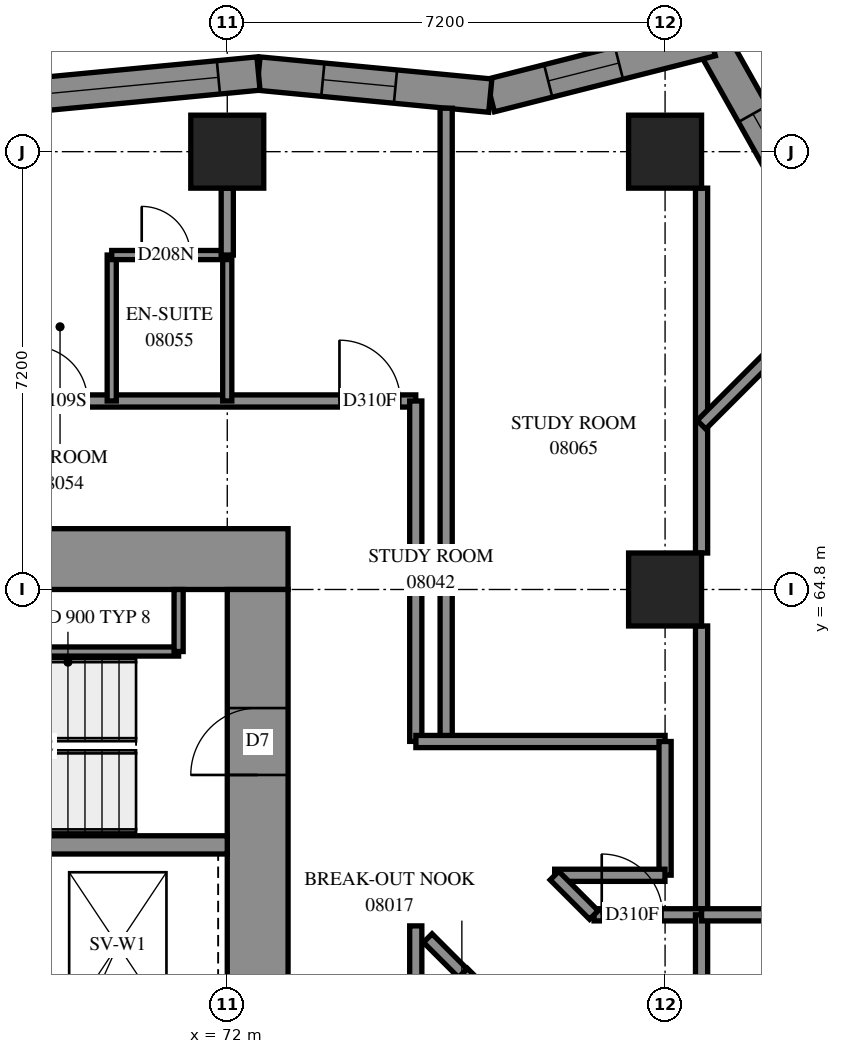
"""IFC4 building model, lengths in metres.
Left out: names, types, materials, properties, quantities, classifications, styles, units other than length and angle.
Written with IfcOpenShell. Run it as: python <this file> out.ifc"""

import sys

from ifc_helpers import new_model, si_unit, direction, frame, frame_2d, origin, origin_2d, place, context, subcontext, project, spatial, polyline, rectangle, outline, extrude, element, fill, save


model = new_model("IFC4")
c1 = context("Model", 3, precision=1e-05, world=origin(), true_north=direction((0.0, 1.0)))
c2 = subcontext(c1, "Body", "Model", "MODEL_VIEW")
j1 = project(units=[si_unit("LENGTHUNIT", "METRE"), si_unit("PLANEANGLEUNIT", "RADIAN")], contexts=[c1])
p1 = place(None, origin())
s1 = spatial("IfcSite", under=j1, at=p1, CompositionType="ELEMENT")
p2 = place(p1, origin())
s2 = spatial("IfcBuilding", under=s1, at=p2, CompositionType="ELEMENT")
p3 = place(p2, frame((0.0, 0.0, 33.8)))
s3 = spatial("IfcBuildingStorey", under=s2, at=p3, CompositionType="ELEMENT", Elevation=33.8)
for number, where, z_axis, x_axis in (
    (1, (72.0, 72.0, 0.0), (0.0, 0.0, 1.0), (1.0, 0.0, 0.0)),
    (2, (79.2, 64.8, 0.0), (0.0, 0.0, 1.0), (1.0, 0.0, 0.0)),
    (3, (79.2, 72.0, 0.0), (0.0, 0.0, 1.0), (1.0, 0.0, 0.0)),
):
    element("IfcColumn", number, at=place(p3, frame(where, z_axis=z_axis, x_axis=x_axis)), inside=s3, PredefinedType="COLUMN", context=c2, shape_type="SweptSolid", body=[
        extrude(rectangle(XDim=1.2, YDim=1.2, at=origin_2d()), origin(), (0.0, 0.0, 1.0), 3.1),
    ])
p4 = place(p3, frame((56.6, 65.3, -0.3), z_axis=(0.0, 0.0, 1.0), x_axis=(1.0, 0.0, 0.0)))
e4 = element("IfcWall", 4, at=p4, inside=s3, PredefinedType="SHEAR", context=c2, shape_type="SweptSolid", body=[
    extrude(rectangle(XDim=16.4, YDim=1.0, at=frame_2d((8.2, 0.0))), origin(), (0.0, 0.0, 1.0), 2.7),
])
p5 = place(p4, frame((11.0, 0.0, 0.3)))
e5 = element("IfcOpeningElement", 5, at=p5, cuts=e4, PredefinedType="OPENING", context=c2, shape_type="SweptSolid", body=[
    extrude(rectangle(XDim=0.8, YDim=2.1, at=frame_2d((0.4, 1.05))), frame((0.0, 0.51, 0.0), z_axis=(0.0, -1.0, 0.0), x_axis=(1.0, 0.0, 0.0)), (0.0, 0.0, 1.0), 1.02),
])
p6 = place(p3, frame((72.5, 50.4, -0.3), z_axis=(0.0, 0.0, 1.0), x_axis=(0.0, 1.0, 0.0)))
e6 = element("IfcWall", 6, at=p6, inside=s3, PredefinedType="SHEAR", context=c2, shape_type="SweptSolid", body=[
    extrude(rectangle(XDim=14.4, YDim=1.0, at=frame_2d((7.2, 0.0))), origin(), (0.0, 0.0, 1.0), 2.7),
])
p7 = place(p6, frame((4.55, 0.0, 0.3)))
e7 = element("IfcOpeningElement", 7, at=p7, cuts=e6, PredefinedType="OPENING", context=c2, shape_type="SweptSolid", body=[
    extrude(rectangle(XDim=1.1, YDim=2.1, at=frame_2d((0.55, 1.05))), frame((0.0, 0.51, 0.0), z_axis=(0.0, -1.0, 0.0), x_axis=(1.0, 0.0, 0.0)), (0.0, 0.0, 1.0), 1.02),
])
p8 = place(p6, frame((11.35, 0.0, 0.3)))
e8 = element("IfcOpeningElement", 8, at=p8, cuts=e6, PredefinedType="OPENING", context=c2, shape_type="SweptSolid", body=[
    extrude(rectangle(XDim=1.1, YDim=2.1, at=frame_2d((0.55, 1.05))), frame((0.0, 0.51, 0.0), z_axis=(0.0, -1.0, 0.0), x_axis=(1.0, 0.0, 0.0)), (0.0, 0.0, 1.0), 1.02),
])
p9 = place(p3, frame((64.8, 60.6, 0.0), z_axis=(0.0, 0.0, 1.0), x_axis=(1.0, 0.0, 0.0)))
e9 = element("IfcWall", 9, at=p9, inside=s3, PredefinedType="SOLIDWALL", context=c2, shape_type="SweptSolid", body=[
    extrude(rectangle(XDim=7.2, YDim=0.3, at=frame_2d((3.6, 0.0))), origin(), (0.0, 0.0, 1.0), 3.1),
])
p10 = place(p3, frame((76.301, 49.443, -0.3), z_axis=(0.0, 0.0, 1.0), x_axis=(0.7071067812, 0.7071067812, 0.0)))
e10 = element("IfcWall", 10, at=p10, inside=s3, PredefinedType="SHEAR", context=c2, shape_type="SweptSolid", body=[
    extrude(rectangle(XDim=14.4, YDim=1.0, at=frame_2d((7.2, 0.0))), origin(), (0.0, 0.0, 1.0), 2.7),
])
p11 = place(p10, frame((4.55, 0.0, 0.3)))
e11 = element("IfcOpeningElement", 11, at=p11, cuts=e10, PredefinedType="OPENING", context=c2, shape_type="SweptSolid", body=[
    extrude(rectangle(XDim=1.1, YDim=2.1, at=frame_2d((0.55, 1.05))), frame((0.0, 0.51, 0.0), z_axis=(0.0, -1.0, 0.0), x_axis=(1.0, 0.0, 0.0)), (0.0, 0.0, 1.0), 1.02),
])
p12 = place(p10, frame((11.35, 0.0, 0.3)))
e12 = element("IfcOpeningElement", 12, at=p12, cuts=e10, PredefinedType="OPENING", context=c2, shape_type="SweptSolid", body=[
    extrude(rectangle(XDim=1.1, YDim=2.1, at=frame_2d((0.55, 1.05))), frame((0.0, 0.51, 0.0), z_axis=(0.0, -1.0, 0.0), x_axis=(1.0, 0.0, 0.0)), (0.0, 0.0, 1.0), 1.02),
])
p13 = place(p3, frame((81.628, 70.875, 0.0), z_axis=(0.0, 0.0, 1.0), x_axis=(-0.4901845493, 0.871618671, 0.0)))
e13 = element("IfcWall", 13, at=p13, inside=s3, PredefinedType="SOLIDWALL", context=c2, shape_type="SweptSolid", body=[
    extrude(outline(polyline([(0.053, -0.275), (3.616, -0.275), (3.195, 0.275), (-0.053, 0.275), (0.053, -0.275)])), origin(), (0.0, 0.0, 1.0), 3.1),
])
p14 = place(p13, frame((0.804, 0.0, 0.5)))
e14 = element("IfcOpeningElement", 14, at=p14, cuts=e13, PredefinedType="OPENING", context=c2, shape_type="SweptSolid", body=[
    extrude(rectangle(XDim=1.2, YDim=2.45, at=frame_2d((0.6, 1.225))), frame((0.0, 0.285, 0.0), z_axis=(0.0, -1.0, 0.0), x_axis=(1.0, 0.0, 0.0)), (0.0, 0.0, 1.0), 0.57),
])
p15 = place(p3, frame((79.959, 73.843, 0.0), z_axis=(0.0, 0.0, 1.0), x_axis=(-0.9693399956, -0.2457233667, 0.0)))
e15 = element("IfcWall", 15, at=p15, inside=s3, PredefinedType="SOLIDWALL", context=c2, shape_type="SweptSolid", body=[
    extrude(outline(polyline([(-0.21, -0.275), (3.7, -0.275), (3.796, 0.275), (0.21, 0.275), (-0.21, -0.275)])), origin(), (0.0, 0.0, 1.0), 3.1),
])
p16 = place(p15, frame((1.565, 0.0, 0.5)))
e16 = element("IfcOpeningElement", 16, at=p16, cuts=e15, PredefinedType="OPENING", context=c2, shape_type="SweptSolid", body=[
    extrude(rectangle(XDim=1.2, YDim=2.45, at=frame_2d((0.6, 1.225))), frame((0.0, 0.285, 0.0), z_axis=(0.0, -1.0, 0.0), x_axis=(1.0, 0.0, 0.0)), (0.0, 0.0, 1.0), 0.57),
])
p17 = place(p3, frame((76.326, 72.922, 0.0), z_axis=(0.0, 0.0, 1.0), x_axis=(-0.9954951205, 0.0948127894, 0.0)))
e17 = element("IfcWall", 17, at=p17, inside=s3, PredefinedType="SOLIDWALL", context=c2, shape_type="SweptSolid", body=[
    extrude(outline(polyline([(0.048, -0.275), (3.856, -0.275), (3.803, 0.275), (-0.048, 0.275), (0.048, -0.275)])), origin(), (0.0, 0.0, 1.0), 3.1),
])
p18 = place(p17, frame((1.566, 0.0, 0.5)))
e18 = element("IfcOpeningElement", 18, at=p18, cuts=e17, PredefinedType="OPENING", context=c2, shape_type="SweptSolid", body=[
    extrude(rectangle(XDim=1.2, YDim=2.45, at=frame_2d((0.6, 1.225))), frame((0.0, 0.285, 0.0), z_axis=(0.0, -1.0, 0.0), x_axis=(1.0, 0.0, 0.0)), (0.0, 0.0, 1.0), 0.57),
])
p19 = place(p3, frame((72.513, 73.285, 0.0), z_axis=(0.0, 0.0, 1.0), x_axis=(-0.9954966527, -0.0947967005, 0.0)))
e19 = element("IfcWall", 19, at=p19, inside=s3, PredefinedType="SOLIDWALL", context=c2, shape_type="SweptSolid", body=[
    extrude(outline(polyline([(-0.026, -0.275), (3.782, -0.275), (3.834, 0.275), (0.026, 0.275), (-0.026, -0.275)])), origin(), (0.0, 0.0, 1.0), 3.1),
])
p20 = place(p19, frame((0.662, 0.0, 0.5)))
e20 = element("IfcOpeningElement", 20, at=p20, cuts=e19, PredefinedType="OPENING", context=c2, shape_type="SweptSolid", body=[
    extrude(rectangle(XDim=2.8, YDim=2.45, at=frame_2d((1.4, 1.225))), frame((0.0, 0.285, 0.0), z_axis=(0.0, -1.0, 0.0), x_axis=(1.0, 0.0, 0.0)), (0.0, 0.0, 1.0), 0.57),
])
p21 = place(p3, frame((64.95, 63.78, 0.0), z_axis=(0.0, 0.0, 1.0), x_axis=(1.0, 0.0, 0.0)))
e21 = element("IfcWall", 21, at=p21, inside=s3, PredefinedType="PARTITIONING", context=c2, shape_type="SweptSolid", body=[
    extrude(rectangle(XDim=6.25, YDim=0.15, at=frame_2d((3.125, 0.0))), origin(), (0.0, 0.0, 1.0), 3.1),
])
p22 = place(p3, frame((71.2, 63.78, 0.0), z_axis=(0.0, 0.0, 1.0), x_axis=(0.0, 1.0, 0.0)))
e22 = element("IfcWall", 22, at=p22, inside=s3, PredefinedType="PARTITIONING", context=c2, shape_type="SweptSolid", body=[
    extrude(rectangle(XDim=1.02, YDim=0.15, at=frame_2d((0.51, 0.0))), origin(), (0.0, 0.0, 1.0), 3.1),
])
p23 = place(p3, frame((54.5, 67.9, 0.0), z_axis=(0.0, 0.0, 1.0), x_axis=(1.0, 0.0, 0.0)))
e23 = element("IfcWall", 23, at=p23, inside=s3, PredefinedType="PARTITIONING", context=c2, shape_type="SweptSolid", body=[
    extrude(rectangle(XDim=20.6, YDim=0.2, at=frame_2d((10.3, 0.0))), origin(), (0.0, 0.0, 1.0), 3.1),
])
p24 = place(p23, frame((0.255, 0.0, 0.0)))
e24 = element("IfcOpeningElement", 24, at=p24, cuts=e23, PredefinedType="OPENING", context=c2, shape_type="SweptSolid", body=[
    extrude(rectangle(XDim=1.0, YDim=2.1, at=frame_2d((0.5, 1.05))), frame((0.0, 0.11, 0.0), z_axis=(0.0, -1.0, 0.0), x_axis=(1.0, 0.0, 0.0)), (0.0, 0.0, 1.0), 0.22),
])
p25 = place(p23, frame((19.345, 0.0, 0.0)))
e25 = element("IfcOpeningElement", 25, at=p25, cuts=e23, PredefinedType="OPENING", context=c2, shape_type="SweptSolid", body=[
    extrude(rectangle(XDim=1.0, YDim=2.1, at=frame_2d((0.5, 1.05))), frame((0.0, 0.11, 0.0), z_axis=(0.0, -1.0, 0.0), x_axis=(1.0, 0.0, 0.0)), (0.0, 0.0, 1.0), 0.22),
])
p26 = place(p23, frame((5.45, 0.0, 0.0)))
e26 = element("IfcOpeningElement", 26, at=p26, cuts=e23, PredefinedType="OPENING", context=c2, shape_type="SweptSolid", body=[
    extrude(rectangle(XDim=0.9, YDim=2.1, at=frame_2d((0.45, 1.05))), frame((0.0, 0.11, 0.0), z_axis=(0.0, -1.0, 0.0), x_axis=(1.0, 0.0, 0.0)), (0.0, 0.0, 1.0), 0.22),
])
p27 = place(p23, frame((7.1, 0.0, 0.0)))
e27 = element("IfcOpeningElement", 27, at=p27, cuts=e23, PredefinedType="OPENING", context=c2, shape_type="SweptSolid", body=[
    extrude(rectangle(XDim=0.9, YDim=2.1, at=frame_2d((0.45, 1.05))), frame((0.0, 0.11, 0.0), z_axis=(0.0, -1.0, 0.0), x_axis=(1.0, 0.0, 0.0)), (0.0, 0.0, 1.0), 0.22),
])
p28 = place(p23, frame((12.65, 0.0, 0.0)))
e28 = element("IfcOpeningElement", 28, at=p28, cuts=e23, PredefinedType="OPENING", context=c2, shape_type="SweptSolid", body=[
    extrude(rectangle(XDim=0.9, YDim=2.1, at=frame_2d((0.45, 1.05))), frame((0.0, 0.11, 0.0), z_axis=(0.0, -1.0, 0.0), x_axis=(1.0, 0.0, 0.0)), (0.0, 0.0, 1.0), 0.22),
])
p29 = place(p23, frame((14.3, 0.0, 0.0)))
e29 = element("IfcOpeningElement", 29, at=p29, cuts=e23, PredefinedType="OPENING", context=c2, shape_type="SweptSolid", body=[
    extrude(rectangle(XDim=0.9, YDim=2.1, at=frame_2d((0.45, 1.05))), frame((0.0, 0.11, 0.0), z_axis=(0.0, -1.0, 0.0), x_axis=(1.0, 0.0, 0.0)), (0.0, 0.0, 1.0), 0.22),
])
p30 = place(p3, frame((75.6, 62.3, 0.0), z_axis=(0.0, 0.0, 1.0), x_axis=(0.0, 1.0, 0.0)))
e30 = element("IfcWall", 30, at=p30, inside=s3, PredefinedType="PARTITIONING", context=c2, shape_type="SweptSolid", body=[
    extrude(rectangle(XDim=10.415, YDim=0.2, at=frame_2d((5.207, 0.0))), origin(), (0.0, 0.0, 1.0), 3.1),
])
p31 = place(p3, frame((79.8, 65.4, 0.0), z_axis=(0.0, 0.0, 1.0), x_axis=(0.0, 1.0, 0.0)))
e31 = element("IfcWall", 31, at=p31, inside=s3, PredefinedType="PARTITIONING", context=c2, shape_type="SweptSolid", body=[
    extrude(rectangle(XDim=6.0, YDim=0.2, at=frame_2d((3.0, 0.0))), origin(), (0.0, 0.0, 1.0), 3.1),
])
p32 = place(p3, frame((75.1, 62.302, 0.0), z_axis=(0.0, 0.0, 1.0), x_axis=(0.0, 1.0, 0.0)))
e32 = element("IfcWall", 32, at=p32, inside=s3, PredefinedType="PARTITIONING", context=c2, shape_type="SweptSolid", body=[
    extrude(rectangle(XDim=5.598, YDim=0.2, at=frame_2d((2.799, 0.0))), origin(), (0.0, 0.0, 1.0), 3.1),
])
p33 = place(p3, frame((79.8, 59.45, 0.0), z_axis=(0.0, 0.0, 1.0), x_axis=(0.0, 1.0, 0.0)))
e33 = element("IfcWall", 33, at=p33, inside=s3, PredefinedType="PARTITIONING", context=c2, shape_type="SweptSolid", body=[
    extrude(rectangle(XDim=4.75, YDim=0.2, at=frame_2d((2.375, 0.0))), origin(), (0.0, 0.0, 1.0), 3.1),
])
p34 = place(p3, frame((75.1, 55.102, 0.0), z_axis=(0.0, 0.0, 1.0), x_axis=(0.0, 1.0, 0.0)))
e34 = element("IfcWall", 34, at=p34, inside=s3, PredefinedType="PARTITIONING", context=c2, shape_type="SweptSolid", body=[
    extrude(rectangle(XDim=4.166, YDim=0.2, at=frame_2d((2.083, 0.0))), origin(), (0.0, 0.0, 1.0), 3.1),
])
p35 = place(p3, frame((75.102, 62.3, 0.0), z_axis=(0.0, 0.0, 1.0), x_axis=(1.0, 0.0, 0.0)))
e35 = element("IfcWall", 35, at=p35, inside=s3, PredefinedType="PARTITIONING", context=c2, shape_type="SweptSolid", body=[
    extrude(rectangle(XDim=4.098, YDim=0.2, at=frame_2d((2.049, 0.0))), origin(), (0.0, 0.0, 1.0), 3.1),
])
p36 = place(p3, frame((79.799, 67.509, 0.0), z_axis=(0.0, 0.0, 1.0), x_axis=(0.7070925395, 0.7071210226, 0.0)))
e36 = element("IfcWall", 36, at=p36, inside=s3, PredefinedType="PARTITIONING", context=c2, shape_type="SweptSolid", body=[
    extrude(rectangle(XDim=3.511, YDim=0.2, at=frame_2d((1.755, 0.0))), origin(), (0.0, 0.0, 1.0), 3.1),
])
for number, where, z_axis, x_axis in (
    (37, (70.1, 67.9, 0.0), (0.0, 0.0, 1.0), (0.0, 1.0, 0.0)),
    (38, (72.0, 67.9, 0.0), (0.0, 0.0, 1.0), (0.0, 1.0, 0.0)),
):
    element("IfcWall", number, at=place(p3, frame(where, z_axis=z_axis, x_axis=x_axis)), inside=s3, PredefinedType="PARTITIONING", context=c2, shape_type="SweptSolid", body=[
        extrude(rectangle(XDim=2.4, YDim=0.15, at=frame_2d((1.2, 0.0))), origin(), (0.0, 0.0, 1.0), 3.1),
    ])
p37 = place(p3, frame((79.2, 60.102, 0.0), z_axis=(0.0, 0.0, 1.0), x_axis=(0.0, 1.0, 0.0)))
e39 = element("IfcWall", 39, at=p37, inside=s3, PredefinedType="PARTITIONING", context=c2, shape_type="SweptSolid", body=[
    extrude(rectangle(XDim=2.198, YDim=0.2, at=frame_2d((1.099, 0.0))), origin(), (0.0, 0.0, 1.0), 3.1),
])
p38 = place(p3, frame((75.879, 58.497, 0.0), z_axis=(0.0, 0.0, 1.0), x_axis=(0.7075866635, -0.706626573, 0.0)))
e40 = element("IfcWall", 40, at=p38, inside=s3, PredefinedType="PARTITIONING", context=c2, shape_type="SweptSolid", body=[
    extrude(rectangle(XDim=2.083, YDim=0.2, at=frame_2d((1.042, 0.0))), origin(), (0.0, 0.0, 1.0), 3.1),
])
p39 = place(p3, frame((70.1, 70.3, 0.0), z_axis=(0.0, 0.0, 1.0), x_axis=(1.0, 0.0, 0.0)))
e41 = element("IfcWall", 41, at=p39, inside=s3, PredefinedType="PARTITIONING", context=c2, shape_type="SweptSolid", body=[
    extrude(rectangle(XDim=1.9, YDim=0.15, at=frame_2d((0.95, 0.0))), origin(), (0.0, 0.0, 1.0), 3.1),
])
p40 = place(p39, frame((0.493, 0.0, 0.0)))
e42 = element("IfcOpeningElement", 42, at=p40, cuts=e41, PredefinedType="OPENING", context=c2, shape_type="SweptSolid", body=[
    extrude(rectangle(XDim=0.8, YDim=2.1, at=frame_2d((0.4, 1.05))), frame((0.0, 0.085, 0.0), z_axis=(0.0, -1.0, 0.0), x_axis=(1.0, 0.0, 0.0)), (0.0, 0.0, 1.0), 0.17),
])
p41 = place(p3, frame((77.384, 60.1, 0.0), z_axis=(0.0, 0.0, 1.0), x_axis=(1.0, 0.0, 0.0)))
e43 = element("IfcWall", 43, at=p41, inside=s3, PredefinedType="PARTITIONING", context=c2, shape_type="SweptSolid", body=[
    extrude(rectangle(XDim=1.814, YDim=0.2, at=frame_2d((0.907, 0.0))), origin(), (0.0, 0.0, 1.0), 3.1),
])
p42 = place(p3, frame((78.032, 59.45, 0.0), z_axis=(0.0, 0.0, 1.0), x_axis=(1.0, 0.0, 0.0)))
e44 = element("IfcWall", 44, at=p42, inside=s3, PredefinedType="PARTITIONING", context=c2, shape_type="SweptSolid", body=[
    extrude(rectangle(XDim=1.768, YDim=0.2, at=frame_2d((0.884, 0.0))), origin(), (0.0, 0.0, 1.0), 3.1),
])
p43 = place(p42, frame((0.126, 0.0, 0.0)))
e45 = element("IfcOpeningElement", 45, at=p43, cuts=e44, PredefinedType="OPENING", context=c2, shape_type="SweptSolid", body=[
    extrude(rectangle(XDim=1.0, YDim=2.1, at=frame_2d((0.5, 1.05))), frame((0.0, 0.11, 0.0), z_axis=(0.0, -1.0, 0.0), x_axis=(1.0, 0.0, 0.0)), (0.0, 0.0, 1.0), 0.22),
])
p44 = place(p3, frame((79.8, 58.2, 0.0), z_axis=(0.0, 0.0, 1.0), x_axis=(0.0, 1.0, 0.0)))
e46 = element("IfcWall", 46, at=p44, inside=s3, PredefinedType="PARTITIONING", context=c2, shape_type="SweptSolid", body=[
    extrude(rectangle(XDim=1.25, YDim=0.2, at=frame_2d((0.625, 0.0))), origin(), (0.0, 0.0, 1.0), 3.1),
])
p45 = place(p3, frame((79.8, 59.45, 0.0), z_axis=(0.0, 0.0, 1.0), x_axis=(1.0, 0.0, 0.0)))
e47 = element("IfcWall", 47, at=p45, inside=s3, PredefinedType="PARTITIONING", context=c2, shape_type="SweptSolid", body=[
    extrude(rectangle(XDim=1.248, YDim=0.2, at=frame_2d((0.624, 0.0))), origin(), (0.0, 0.0, 1.0), 3.1),
])
p46 = place(p3, frame((72.0, 70.3, 0.0), z_axis=(0.0, 0.0, 1.0), x_axis=(0.0, 1.0, 0.0)))
e48 = element("IfcWall", 48, at=p46, inside=s3, PredefinedType="PARTITIONING", context=c2, shape_type="SweptSolid", body=[
    extrude(rectangle(XDim=1.1, YDim=0.2, at=frame_2d((0.55, 0.0))), origin(), (0.0, 0.0, 1.0), 3.1),
])
p47 = place(p3, frame((77.381, 60.095, 0.0), z_axis=(0.0, 0.0, 1.0), x_axis=(0.7071067812, -0.7071067812, 0.0)))
e49 = element("IfcWall", 49, at=p47, inside=s3, PredefinedType="PARTITIONING", context=c2, shape_type="SweptSolid", body=[
    extrude(rectangle(XDim=0.916, YDim=0.2, at=frame_2d((0.458, 0.0))), origin(), (0.0, 0.0, 1.0), 3.1),
])
p48 = place(p3, frame((75.297, 59.067, 0.0), z_axis=(0.0, 0.0, 1.0), x_axis=(0.7071067812, -0.7071067812, 0.0)))
e50 = element("IfcWall", 50, at=p48, inside=s3, PredefinedType="PARTITIONING", context=c2, shape_type="SweptSolid", body=[
    extrude(rectangle(XDim=0.815, YDim=0.2, at=frame_2d((0.407, 0.0))), origin(), (0.0, 0.0, 1.0), 3.1),
])
p49 = place(p14, origin())
e51 = element("IfcWindow", 51, at=p49, inside=s3, PartitioningType="SINGLE_PANEL", PredefinedType="WINDOW", context=c2, shape_type="SweptSolid", body=[
    extrude(rectangle(XDim=1.2, YDim=2.45, at=frame_2d((0.6, 1.225))), frame((0.0, 0.155, 0.0), z_axis=(0.0, -1.0, 0.0), x_axis=(1.0, 0.0, 0.0)), (0.0, 0.0, 1.0), 0.06),
])
fill(e14, e51)
p50 = place(p16, origin())
e52 = element("IfcWindow", 52, at=p50, inside=s3, PartitioningType="SINGLE_PANEL", PredefinedType="WINDOW", context=c2, shape_type="SweptSolid", body=[
    extrude(rectangle(XDim=1.2, YDim=2.45, at=frame_2d((0.6, 1.225))), frame((0.0, 0.155, 0.0), z_axis=(0.0, -1.0, 0.0), x_axis=(1.0, 0.0, 0.0)), (0.0, 0.0, 1.0), 0.06),
])
fill(e16, e52)
p51 = place(p18, origin())
e53 = element("IfcWindow", 53, at=p51, inside=s3, PartitioningType="SINGLE_PANEL", PredefinedType="WINDOW", context=c2, shape_type="SweptSolid", body=[
    extrude(rectangle(XDim=1.2, YDim=2.45, at=frame_2d((0.6, 1.225))), frame((0.0, 0.155, 0.0), z_axis=(0.0, -1.0, 0.0), x_axis=(1.0, 0.0, 0.0)), (0.0, 0.0, 1.0), 0.06),
])
fill(e18, e53)
p52 = place(p20, origin())
e54 = element("IfcWindow", 54, at=p52, inside=s3, PartitioningType="SINGLE_PANEL", PredefinedType="WINDOW", context=c2, shape_type="SweptSolid", body=[
    extrude(rectangle(XDim=2.8, YDim=2.45, at=frame_2d((1.4, 1.225))), frame((0.0, 0.155, 0.0), z_axis=(0.0, -1.0, 0.0), x_axis=(1.0, 0.0, 0.0)), (0.0, 0.0, 1.0), 0.06),
])
fill(e20, e54)
p53 = place(p8, origin())
e55 = element("IfcDoor", 55, at=p53, inside=s3, OperationType="SINGLE_SWING_RIGHT", PredefinedType="DOOR", context=c2, shape_type="SweptSolid", body=[
    extrude(rectangle(XDim=1.1, YDim=2.1, at=frame_2d((0.55, 1.05))), frame((0.0, 0.025, 0.0), z_axis=(0.0, -1.0, 0.0), x_axis=(1.0, 0.0, 0.0)), (0.0, 0.0, 1.0), 0.05),
])
fill(e8, e55)
p54 = place(p25, origin())
e56 = element("IfcDoor", 56, at=p54, inside=s3, OperationType="SINGLE_SWING_RIGHT", PredefinedType="DOOR", context=c2, shape_type="SweptSolid", body=[
    extrude(rectangle(XDim=1.0, YDim=2.1, at=frame_2d((0.5, 1.05))), frame((0.0, 0.025, 0.0), z_axis=(0.0, -1.0, 0.0), x_axis=(1.0, 0.0, 0.0)), (0.0, 0.0, 1.0), 0.05),
])
fill(e25, e56)
p55 = place(p29, origin())
e57 = element("IfcDoor", 57, at=p55, inside=s3, OperationType="SINGLE_SWING_LEFT", PredefinedType="DOOR", context=c2, shape_type="SweptSolid", body=[
    extrude(rectangle(XDim=0.9, YDim=2.1, at=frame_2d((0.45, 1.05))), frame((0.0, 0.025, 0.0), z_axis=(0.0, -1.0, 0.0), x_axis=(1.0, 0.0, 0.0)), (0.0, 0.0, 1.0), 0.05),
])
fill(e29, e57)
p56 = place(p40, origin())
e58 = element("IfcDoor", 58, at=p56, inside=s3, OperationType="SINGLE_SWING_RIGHT", PredefinedType="DOOR", context=c2, shape_type="SweptSolid", body=[
    extrude(rectangle(XDim=0.8, YDim=2.1, at=frame_2d((0.4, 1.05))), frame((0.0, 0.025, 0.0), z_axis=(0.0, -1.0, 0.0), x_axis=(1.0, 0.0, 0.0)), (0.0, 0.0, 1.0), 0.05),
])
fill(e42, e58)
p57 = place(p43, origin())
e59 = element("IfcDoor", 59, at=p57, inside=s3, OperationType="SINGLE_SWING_LEFT", PredefinedType="DOOR", context=c2, shape_type="SweptSolid", body=[
    extrude(rectangle(XDim=1.0, YDim=2.1, at=frame_2d((0.5, 1.05))), frame((0.0, 0.025, 0.0), z_axis=(0.0, -1.0, 0.0), x_axis=(1.0, 0.0, 0.0)), (0.0, 0.0, 1.0), 0.05),
])
fill(e45, e59)
save(model, sys.argv[1])
